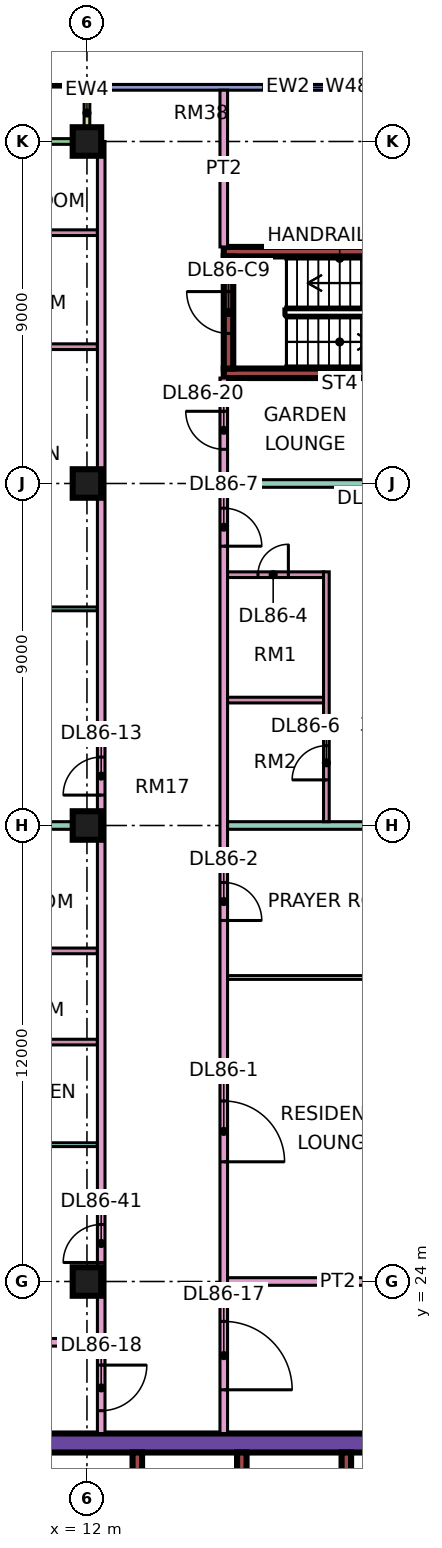
"""IFC4 building model, lengths in metres.
Left out: names, types, materials, properties, quantities, classifications, styles, units other than length and angle.
Written with IfcOpenShell. Run it as: python <this file> out.ifc"""

import sys

from ifc_helpers import new_model, si_unit, direction, frame, frame_2d, origin, origin_2d, place, context, subcontext, project, spatial, rectangle, extrude, element, fill, save


model = new_model("IFC4")
c1 = context("Model", 3, precision=1e-05, world=origin(), true_north=direction((0.0, 1.0)))
c2 = subcontext(c1, "Body", "Model", "MODEL_VIEW")
j1 = project(units=[si_unit("LENGTHUNIT", "METRE"), si_unit("PLANEANGLEUNIT", "RADIAN")], contexts=[c1])
p1 = place(None, origin())
s1 = spatial("IfcSite", under=j1, at=p1, CompositionType="ELEMENT")
p2 = place(p1, origin())
s2 = spatial("IfcBuilding", under=s1, at=p2, CompositionType="ELEMENT")
p3 = place(p2, frame((0.0, 0.0, 368.9)))
s3 = spatial("IfcBuildingStorey", under=s2, at=p3, CompositionType="ELEMENT", Elevation=368.9)
for number, where, z_axis, x_axis in (
    (1, (12.0, 24.0, 0.0), (0.0, 0.0, 1.0), (1.0, 0.0, 0.0)),
    (2, (12.0, 36.0, 0.0), (0.0, 0.0, 1.0), (1.0, 0.0, 0.0)),
    (3, (12.0, 45.0, 0.0), (0.0, 0.0, 1.0), (1.0, 0.0, 0.0)),
    (4, (12.0, 54.0, 0.0), (0.0, 0.0, 1.0), (1.0, 0.0, 0.0)),
):
    element("IfcColumn", number, at=place(p3, frame(where, z_axis=z_axis, x_axis=x_axis)), inside=s3, PredefinedType="COLUMN", context=c2, shape_type="SweptSolid", body=[
        extrude(rectangle(XDim=0.75, YDim=0.75, at=origin_2d()), origin(), (0.0, 0.0, 1.0), 3.75),
    ])
p4 = place(p3, frame((9.0, 19.75, 0.0), z_axis=(0.0, 0.0, 1.0), x_axis=(1.0, 0.0, 0.0)))
e5 = element("IfcWall", 5, at=p4, inside=s3, PredefinedType="SHEAR", context=c2, shape_type="SweptSolid", body=[
    extrude(rectangle(XDim=25.0, YDim=0.5, at=frame_2d((12.5, 0.0))), origin(), (0.0, 0.0, 1.0), 3.75),
])
p5 = place(p4, frame((19.1, 0.0, 0.0)))
e6 = element("IfcOpeningElement", 6, at=p5, cuts=e5, PredefinedType="OPENING", context=c2, shape_type="SweptSolid", body=[
    extrude(rectangle(XDim=1.8, YDim=2.4, at=frame_2d((0.9, 1.2))), frame((0.0, 0.26, 0.0), z_axis=(0.0, -1.0, 0.0), x_axis=(1.0, 0.0, 0.0)), (0.0, 0.0, 1.0), 0.52),
])
p6 = place(p3, frame((13.325, 7.5, 0.0), z_axis=(0.0, 0.0, 1.0), x_axis=(0.0, 1.0, 0.0)))
e7 = element("IfcWall", 7, at=p6, inside=s3, PredefinedType="SHEAR", context=c2, shape_type="SweptSolid", body=[
    extrude(rectangle(XDim=12.0, YDim=0.25, at=frame_2d((6.0, 0.0))), origin(), (0.0, 0.0, 1.0), 3.75),
])
for number, where, z_axis, x_axis in (
    (8, (16.075, 15.8, 0.0), (0.0, 0.0, 1.0), (0.0, 1.0, 0.0)),
    (9, (18.825, 15.8, 0.0), (0.0, 0.0, 1.0), (0.0, 1.0, 0.0)),
):
    element("IfcWall", number, at=place(p3, frame(where, z_axis=z_axis, x_axis=x_axis)), inside=s3, PredefinedType="SHEAR", context=c2, shape_type="SweptSolid", body=[
        extrude(rectangle(XDim=3.7, YDim=0.25, at=frame_2d((1.85, 0.0))), origin(), (0.0, 0.0, 1.0), 3.75),
    ])
for number, where, z_axis, x_axis in (
    (10, (15.6, 47.9, 0.0), (0.0, 0.0, 1.0), (1.0, 0.0, 0.0)),
    (11, (15.6, 51.1, 0.0), (0.0, 0.0, 1.0), (1.0, 0.0, 0.0)),
):
    element("IfcWall", number, at=place(p3, frame(where, z_axis=z_axis, x_axis=x_axis)), inside=s3, PredefinedType="SHEAR", context=c2, shape_type="SweptSolid", body=[
        extrude(rectangle(XDim=7.0, YDim=0.25, at=frame_2d((3.5, 0.0))), origin(), (0.0, 0.0, 1.0), 3.75),
    ])
p7 = place(p3, frame((15.725, 48.025, 0.0), z_axis=(0.0, 0.0, 1.0), x_axis=(0.0, 1.0, 0.0)))
e12 = element("IfcWall", 12, at=p7, inside=s3, PredefinedType="SHEAR", context=c2, shape_type="SweptSolid", body=[
    extrude(rectangle(XDim=2.95, YDim=0.25, at=frame_2d((1.475, 0.0))), origin(), (0.0, 0.0, 1.0), 3.75),
])
p8 = place(p7, frame((0.925, 0.0, 0.0)))
e13 = element("IfcOpeningElement", 13, at=p8, cuts=e12, PredefinedType="OPENING", context=c2, shape_type="SweptSolid", body=[
    extrude(rectangle(XDim=1.1, YDim=2.2, at=frame_2d((0.55, 1.1))), frame((0.0, 0.135, 0.0), z_axis=(0.0, -1.0, 0.0), x_axis=(1.0, 0.0, 0.0)), (0.0, 0.0, 1.0), 0.27),
])
p9 = place(p3, frame((22.5, 55.425, 0.0), z_axis=(0.0, 0.0, 1.0), x_axis=(-1.0, 0.0, 0.0)))
e14 = element("IfcWall", 14, at=p9, inside=s3, PredefinedType="SOLIDWALL", context=c2, shape_type="SweptSolid", body=[
    extrude(rectangle(XDim=10.425, YDim=0.15, at=frame_2d((5.212, 0.0))), origin(), (0.0, 0.0, 1.0), 3.35),
])
p10 = place(p9, frame((1.05, 0.0, 0.45)))
e15 = element("IfcOpeningElement", 15, at=p10, cuts=e14, PredefinedType="OPENING", context=c2, shape_type="SweptSolid", body=[
    extrude(rectangle(XDim=4.8, YDim=2.4, at=frame_2d((2.4, 1.2))), frame((0.0, 0.085, 0.0), z_axis=(0.0, -1.0, 0.0), x_axis=(1.0, 0.0, 0.0)), (0.0, 0.0, 1.0), 0.17),
])
p11 = place(p3, frame((11.925, 54.0, 0.0), z_axis=(0.0, 0.0, 1.0), x_axis=(-1.0, 0.0, 0.0)))
e16 = element("IfcWall", 16, at=p11, inside=s3, PredefinedType="SOLIDWALL", context=c2, shape_type="SweptSolid", body=[
    extrude(rectangle(XDim=10.35, YDim=0.15, at=frame_2d((5.175, 0.0))), origin(), (0.0, 0.0, 1.0), 3.35),
])
p12 = place(p11, frame((7.05, 0.0, 0.0)))
e17 = element("IfcOpeningElement", 17, at=p12, cuts=e16, PredefinedType="OPENING", context=c2, shape_type="SweptSolid", body=[
    extrude(rectangle(XDim=1.8, YDim=2.4, at=frame_2d((0.9, 1.2))), frame((0.0, 0.085, 0.0), z_axis=(0.0, -1.0, 0.0), x_axis=(1.0, 0.0, 0.0)), (0.0, 0.0, 1.0), 0.17),
])
p13 = place(p3, frame((12.0, 55.5, 0.0), z_axis=(0.0, 0.0, 1.0), x_axis=(0.0, -1.0, 0.0)))
e18 = element("IfcWall", 18, at=p13, inside=s3, PredefinedType="SOLIDWALL", context=c2, shape_type="SweptSolid", body=[
    extrude(rectangle(XDim=1.5, YDim=0.15, at=frame_2d((0.75, 0.0))), origin(), (0.0, 0.0, 1.0), 3.35),
])
p14 = place(p3, frame((-1.35, 22.4, 0.0), z_axis=(0.0, 0.0, 1.0), x_axis=(1.0, 0.0, 0.0)))
e19 = element("IfcWall", 19, at=p14, inside=s3, PredefinedType="PARTITIONING", context=c2, shape_type="SweptSolid", body=[
    extrude(rectangle(XDim=13.625, YDim=0.2, at=frame_2d((6.812, 0.0))), origin(), (0.0, 0.0, 1.0), 3.35),
])
p15 = place(p3, frame((0.0, 36.0, 0.0), z_axis=(0.0, 0.0, 1.0), x_axis=(1.0, 0.0, 0.0)))
e20 = element("IfcWall", 20, at=p15, inside=s3, PredefinedType="PARTITIONING", context=c2, shape_type="SweptSolid", body=[
    extrude(rectangle(XDim=12.275, YDim=0.2, at=frame_2d((6.137, 0.0))), origin(), (0.0, 0.0, 1.0), 3.35),
])
p16 = place(p3, frame((7.05, 27.6, 0.0), z_axis=(0.0, 0.0, 1.0), x_axis=(1.0, 0.0, 0.0)))
e21 = element("IfcWall", 21, at=p16, inside=s3, PredefinedType="PARTITIONING", context=c2, shape_type="SweptSolid", body=[
    extrude(rectangle(XDim=5.225, YDim=0.1, at=frame_2d((2.612, 0.0))), origin(), (0.0, 0.0, 1.0), 3.35),
])
for number, where, z_axis, x_axis in (
    (22, (7.05, 30.3, 0.0), (0.0, 0.0, 1.0), (1.0, 0.0, 0.0)),
    (23, (7.05, 32.7, 0.0), (0.0, 0.0, 1.0), (1.0, 0.0, 0.0)),
):
    element("IfcWall", number, at=place(p3, frame(where, z_axis=z_axis, x_axis=x_axis)), inside=s3, PredefinedType="PARTITIONING", context=c2, shape_type="SweptSolid", body=[
        extrude(rectangle(XDim=5.225, YDim=0.15, at=frame_2d((2.612, 0.0))), origin(), (0.0, 0.0, 1.0), 3.35),
    ])
p17 = place(p3, frame((7.65, 41.7, 0.0), z_axis=(0.0, 0.0, 1.0), x_axis=(1.0, 0.0, 0.0)))
e24 = element("IfcWall", 24, at=p17, inside=s3, PredefinedType="PARTITIONING", context=c2, shape_type="SweptSolid", body=[
    extrude(rectangle(XDim=4.625, YDim=0.1, at=frame_2d((2.312, 0.0))), origin(), (0.0, 0.0, 1.0), 3.35),
])
for number, where, z_axis, x_axis in (
    (25, (7.65, 48.6, 0.0), (0.0, 0.0, 1.0), (1.0, 0.0, 0.0)),
    (26, (7.65, 51.6, 0.0), (0.0, 0.0, 1.0), (1.0, 0.0, 0.0)),
):
    element("IfcWall", number, at=place(p3, frame(where, z_axis=z_axis, x_axis=x_axis)), inside=s3, PredefinedType="PARTITIONING", context=c2, shape_type="SweptSolid", body=[
        extrude(rectangle(XDim=4.625, YDim=0.15, at=frame_2d((2.312, 0.0))), origin(), (0.0, 0.0, 1.0), 3.35),
    ])
p18 = place(p3, frame((12.375, 20.0, 0.0), z_axis=(0.0, 0.0, 1.0), x_axis=(0.0, 1.0, 0.0)))
e27 = element("IfcWall", 27, at=p18, inside=s3, PredefinedType="PARTITIONING", context=c2, shape_type="SweptSolid", body=[
    extrude(rectangle(XDim=34.0, YDim=0.2, at=frame_2d((17.0, 0.0))), origin(), (0.0, 0.0, 1.0), 3.35),
])
p19 = place(p18, frame((16.8, 0.0, 0.0)))
e28 = element("IfcOpeningElement", 28, at=p19, cuts=e27, PredefinedType="OPENING", context=c2, shape_type="SweptSolid", body=[
    extrude(rectangle(XDim=1.0, YDim=2.1, at=frame_2d((0.5, 1.05))), frame((0.0, 0.11, 0.0), z_axis=(0.0, -1.0, 0.0), x_axis=(1.0, 0.0, 0.0)), (0.0, 0.0, 1.0), 0.22),
])
p20 = place(p18, frame((0.6, 0.0, 0.0)))
e29 = element("IfcOpeningElement", 29, at=p20, cuts=e27, PredefinedType="OPENING", context=c2, shape_type="SweptSolid", body=[
    extrude(rectangle(XDim=1.2, YDim=2.1, at=frame_2d((0.6, 1.05))), frame((0.0, 0.11, 0.0), z_axis=(0.0, -1.0, 0.0), x_axis=(1.0, 0.0, 0.0)), (0.0, 0.0, 1.0), 0.22),
])
p21 = place(p18, frame((4.5, 0.0, 0.0)))
e30 = element("IfcOpeningElement", 30, at=p21, cuts=e27, PredefinedType="OPENING", context=c2, shape_type="SweptSolid", body=[
    extrude(rectangle(XDim=1.0, YDim=2.1, at=frame_2d((0.5, 1.05))), frame((0.0, 0.11, 0.0), z_axis=(0.0, -1.0, 0.0), x_axis=(1.0, 0.0, 0.0)), (0.0, 0.0, 1.0), 0.22),
])
p22 = place(p3, frame((15.6, 20.0, 0.0), z_axis=(0.0, 0.0, 1.0), x_axis=(0.0, 1.0, 0.0)))
e31 = element("IfcWall", 31, at=p22, inside=s3, PredefinedType="PARTITIONING", context=c2, shape_type="SweptSolid", body=[
    extrude(rectangle(XDim=27.775, YDim=0.2, at=frame_2d((13.887, 0.0))), origin(), (0.0, 0.0, 1.0), 3.35),
])
p23 = place(p22, frame((7.15, 0.0, 0.0)))
e32 = element("IfcOpeningElement", 32, at=p23, cuts=e31, PredefinedType="OPENING", context=c2, shape_type="SweptSolid", body=[
    extrude(rectangle(XDim=1.6, YDim=2.1, at=frame_2d((0.8, 1.05))), frame((0.0, 0.11, 0.0), z_axis=(0.0, -1.0, 0.0), x_axis=(1.0, 0.0, 0.0)), (0.0, 0.0, 1.0), 0.22),
])
p24 = place(p22, frame((13.5, 0.0, 0.0)))
e33 = element("IfcOpeningElement", 33, at=p24, cuts=e31, PredefinedType="OPENING", context=c2, shape_type="SweptSolid", body=[
    extrude(rectangle(XDim=1.0, YDim=2.1, at=frame_2d((0.5, 1.05))), frame((0.0, 0.11, 0.0), z_axis=(0.0, -1.0, 0.0), x_axis=(1.0, 0.0, 0.0)), (0.0, 0.0, 1.0), 0.22),
])
p25 = place(p22, frame((23.35, 0.0, 0.0)))
e34 = element("IfcOpeningElement", 34, at=p25, cuts=e31, PredefinedType="OPENING", context=c2, shape_type="SweptSolid", body=[
    extrude(rectangle(XDim=1.0, YDim=2.1, at=frame_2d((0.5, 1.05))), frame((0.0, 0.11, 0.0), z_axis=(0.0, -1.0, 0.0), x_axis=(1.0, 0.0, 0.0)), (0.0, 0.0, 1.0), 0.22),
])
p26 = place(p22, frame((1.15, 0.0, 0.0)))
e35 = element("IfcOpeningElement", 35, at=p26, cuts=e31, PredefinedType="OPENING", context=c2, shape_type="SweptSolid", body=[
    extrude(rectangle(XDim=1.8, YDim=2.1, at=frame_2d((0.9, 1.05))), frame((0.0, 0.11, 0.0), z_axis=(0.0, -1.0, 0.0), x_axis=(1.0, 0.0, 0.0)), (0.0, 0.0, 1.0), 0.22),
])
p27 = place(p22, frame((25.9, 0.0, 0.0)))
e36 = element("IfcOpeningElement", 36, at=p27, cuts=e31, PredefinedType="OPENING", context=c2, shape_type="SweptSolid", body=[
    extrude(rectangle(XDim=1.0, YDim=2.1, at=frame_2d((0.5, 1.05))), frame((0.0, 0.11, 0.0), z_axis=(0.0, -1.0, 0.0), x_axis=(1.0, 0.0, 0.0)), (0.0, 0.0, 1.0), 0.22),
])
p28 = place(p3, frame((15.6, 51.225, 0.0), z_axis=(0.0, 0.0, 1.0), x_axis=(0.0, 1.0, 0.0)))
e37 = element("IfcWall", 37, at=p28, inside=s3, PredefinedType="PARTITIONING", context=c2, shape_type="SweptSolid", body=[
    extrude(rectangle(XDim=4.125, YDim=0.2, at=frame_2d((2.062, 0.0))), origin(), (0.0, 0.0, 1.0), 3.35),
])
p29 = place(p3, frame((15.7, 24.0, 0.0), z_axis=(0.0, 0.0, 1.0), x_axis=(1.0, 0.0, 0.0)))
e38 = element("IfcWall", 38, at=p29, inside=s3, PredefinedType="PARTITIONING", context=c2, shape_type="SweptSolid", body=[
    extrude(rectangle(XDim=5.8, YDim=0.2, at=frame_2d((2.9, 0.0))), origin(), (0.0, 0.0, 1.0), 3.35),
])
p30 = place(p3, frame((15.7, 32.0, 0.0), z_axis=(0.0, 0.0, 1.0), x_axis=(1.0, 0.0, 0.0)))
e39 = element("IfcWall", 39, at=p30, inside=s3, PredefinedType="PARTITIONING", context=c2, shape_type="SweptSolid", body=[
    extrude(rectangle(XDim=5.8, YDim=0.1, at=frame_2d((2.9, 0.0))), origin(), (0.0, 0.0, 1.0), 3.35),
])
p31 = place(p3, frame((15.7, 36.0, 0.0), z_axis=(0.0, 0.0, 1.0), x_axis=(1.0, 0.0, 0.0)))
e40 = element("IfcWall", 40, at=p31, inside=s3, PredefinedType="PARTITIONING", context=c2, shape_type="SweptSolid", body=[
    extrude(rectangle(XDim=8.3, YDim=0.2, at=frame_2d((4.15, 0.0))), origin(), (0.0, 0.0, 1.0), 3.35),
])
p32 = place(p3, frame((15.7, 39.3, 0.0), z_axis=(0.0, 0.0, 1.0), x_axis=(1.0, 0.0, 0.0)))
e41 = element("IfcWall", 41, at=p32, inside=s3, PredefinedType="PARTITIONING", context=c2, shape_type="SweptSolid", body=[
    extrude(rectangle(XDim=2.525, YDim=0.15, at=frame_2d((1.263, 0.0))), origin(), (0.0, 0.0, 1.0), 3.35),
])
p33 = place(p3, frame((15.7, 42.6, 0.0), z_axis=(0.0, 0.0, 1.0), x_axis=(1.0, 0.0, 0.0)))
e42 = element("IfcWall", 42, at=p33, inside=s3, PredefinedType="PARTITIONING", context=c2, shape_type="SweptSolid", body=[
    extrude(rectangle(XDim=2.525, YDim=0.15, at=frame_2d((1.263, 0.0))), origin(), (0.0, 0.0, 1.0), 3.35),
])
p34 = place(p33, frame((0.8, 0.0, 0.0)))
e43 = element("IfcOpeningElement", 43, at=p34, cuts=e42, PredefinedType="OPENING", context=c2, shape_type="SweptSolid", body=[
    extrude(rectangle(XDim=0.8, YDim=2.1, at=frame_2d((0.4, 1.05))), frame((0.0, 0.085, 0.0), z_axis=(0.0, -1.0, 0.0), x_axis=(1.0, 0.0, 0.0)), (0.0, 0.0, 1.0), 0.17),
])
p35 = place(p3, frame((15.7, 45.0, 0.0), z_axis=(0.0, 0.0, 1.0), x_axis=(1.0, 0.0, 0.0)))
e44 = element("IfcWall", 44, at=p35, inside=s3, PredefinedType="PARTITIONING", context=c2, shape_type="SweptSolid", body=[
    extrude(rectangle(XDim=8.3, YDim=0.2, at=frame_2d((4.15, 0.0))), origin(), (0.0, 0.0, 1.0), 3.35),
])
p36 = place(p3, frame((18.3, 36.1, 0.0), z_axis=(0.0, 0.0, 1.0), x_axis=(0.0, 1.0, 0.0)))
e45 = element("IfcWall", 45, at=p36, inside=s3, PredefinedType="PARTITIONING", context=c2, shape_type="SweptSolid", body=[
    extrude(rectangle(XDim=6.575, YDim=0.15, at=frame_2d((3.288, 0.0))), origin(), (0.0, 0.0, 1.0), 3.35),
])
p37 = place(p36, frame((1.1, 0.0, 0.0)))
e46 = element("IfcOpeningElement", 46, at=p37, cuts=e45, PredefinedType="OPENING", context=c2, shape_type="SweptSolid", body=[
    extrude(rectangle(XDim=0.9, YDim=2.1, at=frame_2d((0.45, 1.05))), frame((0.0, 0.085, 0.0), z_axis=(0.0, -1.0, 0.0), x_axis=(1.0, 0.0, 0.0)), (0.0, 0.0, 1.0), 0.17),
])
p38 = place(p10, origin())
e47 = element("IfcWindow", 47, at=p38, inside=s3, PartitioningType="SINGLE_PANEL", PredefinedType="WINDOW", context=c2, shape_type="SweptSolid", body=[
    extrude(rectangle(XDim=4.8, YDim=2.4, at=frame_2d((2.4, 1.2))), frame((0.0, 0.03, 0.0), z_axis=(0.0, -1.0, 0.0), x_axis=(1.0, 0.0, 0.0)), (0.0, 0.0, 1.0), 0.06),
])
fill(e15, e47)
p39 = place(p8, frame((1.1, 0.0, 0.0), z_axis=(0.0, 0.0, 1.0), x_axis=(-1.0, 0.0, 0.0)))
e48 = element("IfcDoor", 48, at=p39, inside=s3, OperationType="SINGLE_SWING_RIGHT", PredefinedType="DOOR", context=c2, shape_type="SweptSolid", body=[
    extrude(rectangle(XDim=1.1, YDim=2.2, at=frame_2d((0.55, 1.1))), frame((0.0, 0.025, 0.0), z_axis=(0.0, -1.0, 0.0), x_axis=(1.0, 0.0, 0.0)), (0.0, 0.0, 1.0), 0.05),
])
fill(e13, e48)
p40 = place(p23, frame((1.6, 0.0, 0.0), z_axis=(0.0, 0.0, 1.0), x_axis=(-1.0, 0.0, 0.0)))
e49 = element("IfcDoor", 49, at=p40, inside=s3, OperationType="DOUBLE_DOOR_SINGLE_SWING", PredefinedType="DOOR", context=c2, shape_type="SweptSolid", body=[
    extrude(rectangle(XDim=1.6, YDim=2.1, at=frame_2d((0.8, 1.05))), frame((0.0, 0.025, 0.0), z_axis=(0.0, -1.0, 0.0), x_axis=(1.0, 0.0, 0.0)), (0.0, 0.0, 1.0), 0.05),
])
fill(e32, e49)
p41 = place(p24, frame((1.0, 0.0, 0.0), z_axis=(0.0, 0.0, 1.0), x_axis=(-1.0, 0.0, 0.0)))
e50 = element("IfcDoor", 50, at=p41, inside=s3, OperationType="SINGLE_SWING_LEFT", PredefinedType="DOOR", context=c2, shape_type="SweptSolid", body=[
    extrude(rectangle(XDim=1.0, YDim=2.1, at=frame_2d((0.5, 1.05))), frame((0.0, 0.025, 0.0), z_axis=(0.0, -1.0, 0.0), x_axis=(1.0, 0.0, 0.0)), (0.0, 0.0, 1.0), 0.05),
])
fill(e33, e50)
p42 = place(p34, frame((0.8, 0.0, 0.0), z_axis=(0.0, 0.0, 1.0), x_axis=(-1.0, 0.0, 0.0)))
e51 = element("IfcDoor", 51, at=p42, inside=s3, OperationType="SINGLE_SWING_RIGHT", PredefinedType="DOOR", context=c2, shape_type="SweptSolid", body=[
    extrude(rectangle(XDim=0.8, YDim=2.1, at=frame_2d((0.4, 1.05))), frame((0.0, 0.025, 0.0), z_axis=(0.0, -1.0, 0.0), x_axis=(1.0, 0.0, 0.0)), (0.0, 0.0, 1.0), 0.05),
])
fill(e43, e51)
p43 = place(p37, origin())
e52 = element("IfcDoor", 52, at=p43, inside=s3, OperationType="SINGLE_SWING_LEFT", PredefinedType="DOOR", context=c2, shape_type="SweptSolid", body=[
    extrude(rectangle(XDim=0.9, YDim=2.1, at=frame_2d((0.45, 1.05))), frame((0.0, 0.025, 0.0), z_axis=(0.0, -1.0, 0.0), x_axis=(1.0, 0.0, 0.0)), (0.0, 0.0, 1.0), 0.05),
])
fill(e46, e52)
p44 = place(p25, frame((1.0, 0.0, 0.0), z_axis=(0.0, 0.0, 1.0), x_axis=(-1.0, 0.0, 0.0)))
e53 = element("IfcDoor", 53, at=p44, inside=s3, OperationType="SINGLE_SWING_LEFT", PredefinedType="DOOR", context=c2, shape_type="SweptSolid", body=[
    extrude(rectangle(XDim=1.0, YDim=2.1, at=frame_2d((0.5, 1.05))), frame((0.0, 0.025, 0.0), z_axis=(0.0, -1.0, 0.0), x_axis=(1.0, 0.0, 0.0)), (0.0, 0.0, 1.0), 0.05),
])
fill(e34, e53)
p45 = place(p19, origin())
e54 = element("IfcDoor", 54, at=p45, inside=s3, OperationType="SINGLE_SWING_LEFT", PredefinedType="DOOR", context=c2, shape_type="SweptSolid", body=[
    extrude(rectangle(XDim=1.0, YDim=2.1, at=frame_2d((0.5, 1.05))), frame((0.0, 0.025, 0.0), z_axis=(0.0, -1.0, 0.0), x_axis=(1.0, 0.0, 0.0)), (0.0, 0.0, 1.0), 0.05),
])
fill(e28, e54)
p46 = place(p26, frame((1.8, 0.0, 0.0), z_axis=(0.0, 0.0, 1.0), x_axis=(-1.0, 0.0, 0.0)))
e55 = element("IfcDoor", 55, at=p46, inside=s3, OperationType="DOUBLE_DOOR_SINGLE_SWING", PredefinedType="DOOR", context=c2, shape_type="SweptSolid", body=[
    extrude(rectangle(XDim=1.8, YDim=2.1, at=frame_2d((0.9, 1.05))), frame((0.0, 0.025, 0.0), z_axis=(0.0, -1.0, 0.0), x_axis=(1.0, 0.0, 0.0)), (0.0, 0.0, 1.0), 0.05),
])
fill(e35, e55)
p47 = place(p20, origin())
e56 = element("IfcDoor", 56, at=p47, inside=s3, OperationType="SINGLE_SWING_RIGHT", PredefinedType="DOOR", context=c2, shape_type="SweptSolid", body=[
    extrude(rectangle(XDim=1.2, YDim=2.1, at=frame_2d((0.6, 1.05))), frame((0.0, 0.025, 0.0), z_axis=(0.0, -1.0, 0.0), x_axis=(1.0, 0.0, 0.0)), (0.0, 0.0, 1.0), 0.05),
])
fill(e29, e56)
p48 = place(p27, frame((1.0, 0.0, 0.0), z_axis=(0.0, 0.0, 1.0), x_axis=(-1.0, 0.0, 0.0)))
e57 = element("IfcDoor", 57, at=p48, inside=s3, OperationType="SINGLE_SWING_RIGHT", PredefinedType="DOOR", context=c2, shape_type="SweptSolid", body=[
    extrude(rectangle(XDim=1.0, YDim=2.1, at=frame_2d((0.5, 1.05))), frame((0.0, 0.025, 0.0), z_axis=(0.0, -1.0, 0.0), x_axis=(1.0, 0.0, 0.0)), (0.0, 0.0, 1.0), 0.05),
])
fill(e36, e57)
p49 = place(p21, origin())
e58 = element("IfcDoor", 58, at=p49, inside=s3, OperationType="SINGLE_SWING_LEFT", PredefinedType="DOOR", context=c2, shape_type="SweptSolid", body=[
    extrude(rectangle(XDim=1.0, YDim=2.1, at=frame_2d((0.5, 1.05))), frame((0.0, 0.025, 0.0), z_axis=(0.0, -1.0, 0.0), x_axis=(1.0, 0.0, 0.0)), (0.0, 0.0, 1.0), 0.05),
])
fill(e30, e58)
save(model, sys.argv[1])
